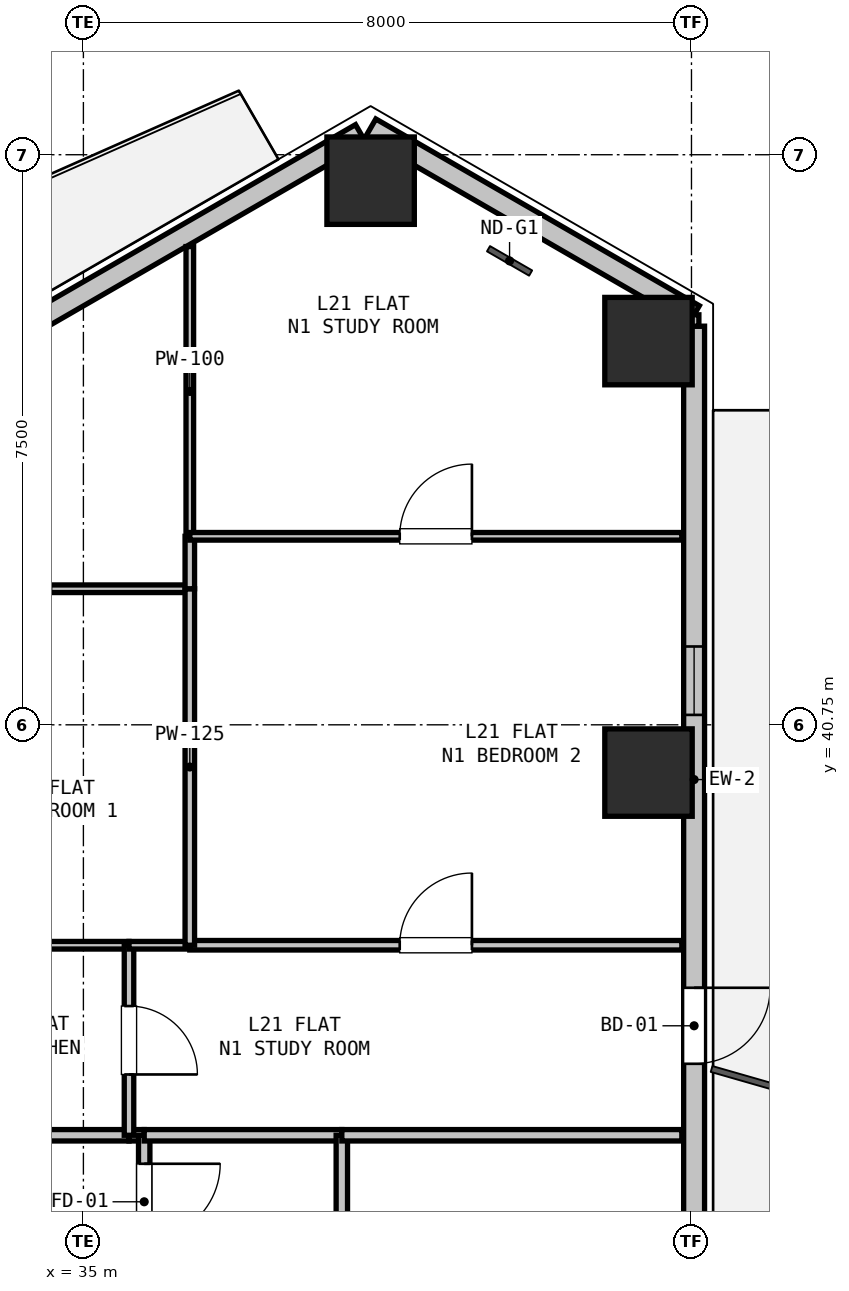
"""IFC4 building model, lengths in metres.
Left out: names, types, materials, properties, quantities, classifications, styles, units other than length and angle.
Written with IfcOpenShell. Run it as: python <this file> out.ifc"""

import sys

from ifc_helpers import new_model, si_unit, direction, frame, frame_2d, origin, origin_2d, place, context, subcontext, project, spatial, rectangle, hollow_rectangle, extrude, element, fill, save


model = new_model("IFC4")
c1 = context("Model", 3, precision=1e-05, world=origin(), true_north=direction((0.0, 1.0)))
c2 = subcontext(c1, "Body", "Model", "MODEL_VIEW")
j1 = project(units=[si_unit("LENGTHUNIT", "METRE"), si_unit("PLANEANGLEUNIT", "RADIAN")], contexts=[c1])
p1 = place(None, origin())
s1 = spatial("IfcSite", under=j1, at=p1, CompositionType="ELEMENT")
p2 = place(p1, origin())
s2 = spatial("IfcBuilding", under=s1, at=p2, CompositionType="ELEMENT")
p3 = place(p2, frame((0.0, 0.0, 80.1)))
s3 = spatial("IfcBuildingStorey", under=s2, at=p3, CompositionType="ELEMENT", Elevation=80.1)
for number, where, z_axis, x_axis in (
    (1, (38.779, 47.909, 0.0), (0.0, 0.0, 1.0), (1.0, 0.0, 0.0)),
    (2, (42.435, 45.798, 0.0), (0.0, 0.0, 1.0), (1.0, 0.0, 0.0)),
    (3, (42.435, 40.122, 0.0), (0.0, 0.0, 1.0), (1.0, 0.0, 0.0)),
):
    element("IfcColumn", number, at=place(p3, frame(where, z_axis=z_axis, x_axis=x_axis)), inside=s3, PredefinedType="COLUMN", context=c2, shape_type="SweptSolid", body=[
        extrude(hollow_rectangle(XDim=1.15, YDim=1.15, WallThickness=0.032, at=origin_2d()), origin(), (0.0, 0.0, 1.0), 3.3),
    ])
p4 = place(p3, frame((38.779, 48.602, 0.0), z_axis=(0.0, 0.0, 1.0), x_axis=(0.866011848704, -0.500023477353, 0.0)))
e4 = element("IfcWall", 4, at=p4, inside=s3, PredefinedType="SOLIDWALL", context=c2, shape_type="SweptSolid", body=[
    extrude(rectangle(XDim=4.914, YDim=0.275, at=frame_2d((2.457, 0.0))), origin(), (0.0, 0.0, 1.0), 2.67),
])
p5 = place(p3, frame((28.317, 42.562, 0.0), z_axis=(0.0, 0.0, 1.0), x_axis=(0.866023023012, 0.500004123596, 0.0)))
e5 = element("IfcWall", 5, at=p5, inside=s3, PredefinedType="SOLIDWALL", context=c2, shape_type="SweptSolid", body=[
    extrude(rectangle(XDim=11.93, YDim=0.275, at=frame_2d((5.965, 0.0))), origin(), (0.0, 0.0, 1.0), 2.67),
])
p6 = place(p5, frame((2.427, 0.0, 0.9)))
e6 = element("IfcOpeningElement", 6, at=p6, cuts=e5, PredefinedType="OPENING", context=c2, shape_type="SweptSolid", body=[
    extrude(rectangle(XDim=0.9, YDim=1.4, at=frame_2d((0.45, 0.7))), frame((0.0, 0.147, 0.0), z_axis=(0.0, -1.0, 0.0), x_axis=(1.0, 0.0, 0.0)), (0.0, 0.0, 1.0), 0.295),
])
p7 = place(p3, frame((43.035, 45.994, 0.0), z_axis=(0.0, 0.0, 1.0), x_axis=(0.0, -1.0, 0.0)))
e7 = element("IfcWall", 7, at=p7, inside=s3, PredefinedType="SOLIDWALL", context=c2, shape_type="SweptSolid", body=[
    extrude(rectangle(XDim=11.93, YDim=0.275, at=frame_2d((5.965, 0.0))), origin(), (0.0, 0.0, 1.0), 2.67),
])
p8 = place(p7, frame((8.704, 0.0, 0.0)))
e8 = element("IfcOpeningElement", 8, at=p8, cuts=e7, PredefinedType="OPENING", context=c2, shape_type="SweptSolid", body=[
    extrude(rectangle(XDim=1.0, YDim=2.1, at=frame_2d((0.5, 1.05))), frame((0.0, 0.147, 0.0), z_axis=(0.0, -1.0, 0.0), x_axis=(1.0, 0.0, 0.0)), (0.0, 0.0, 1.0), 0.295),
])
p9 = place(p7, frame((4.214, 0.0, 0.9)))
e9 = element("IfcOpeningElement", 9, at=p9, cuts=e7, PredefinedType="OPENING", context=c2, shape_type="SweptSolid", body=[
    extrude(rectangle(XDim=0.9, YDim=1.4, at=frame_2d((0.45, 0.7))), frame((0.0, 0.147, 0.0), z_axis=(0.0, -1.0, 0.0), x_axis=(1.0, 0.0, 0.0)), (0.0, 0.0, 1.0), 0.295),
])
p10 = place(p3, frame((32.0, 35.35, 0.0), z_axis=(0.0, 0.0, 1.0), x_axis=(1.0, 0.0, 0.0)))
e10 = element("IfcWall", 10, at=p10, inside=s3, PredefinedType="PARTITIONING", context=c2, shape_type="SweptSolid", body=[
    extrude(rectangle(XDim=3.6, YDim=0.15, at=frame_2d((1.8, 0.0))), origin(), (0.0, 0.0, 1.0), 3.05),
])
p11 = place(p3, frame((35.6, 35.35, 0.0), z_axis=(0.0, 0.0, 1.0), x_axis=(1.0, 0.0, 0.0)))
e11 = element("IfcWall", 11, at=p11, inside=s3, PredefinedType="PARTITIONING", context=c2, shape_type="SweptSolid", body=[
    extrude(rectangle(XDim=0.2, YDim=0.15, at=frame_2d((0.1, 0.0))), origin(), (0.0, 0.0, 1.0), 3.05),
])
p12 = place(p3, frame((35.8, 35.35, 0.0), z_axis=(0.0, 0.0, 1.0), x_axis=(0.0, -1.0, 0.0)))
e12 = element("IfcWall", 12, at=p12, inside=s3, PredefinedType="PARTITIONING", context=c2, shape_type="SweptSolid", body=[
    extrude(rectangle(XDim=1.75, YDim=0.15, at=frame_2d((0.875, 0.0))), origin(), (0.0, 0.0, 1.0), 3.05),
])
p13 = place(p12, frame((0.375, 0.0, 0.0)))
e13 = element("IfcOpeningElement", 13, at=p13, cuts=e12, PredefinedType="OPENING", context=c2, shape_type="SweptSolid", body=[
    extrude(rectangle(XDim=1.0, YDim=2.15, at=frame_2d((0.5, 1.075))), frame((0.0, 0.085, 0.0), z_axis=(0.0, -1.0, 0.0), x_axis=(1.0, 0.0, 0.0)), (0.0, 0.0, 1.0), 0.17),
])
p14 = place(p3, frame((35.8, 35.35, 0.0), z_axis=(0.0, 0.0, 1.0), x_axis=(1.0, 0.0, 0.0)))
e14 = element("IfcWall", 14, at=p14, inside=s3, PredefinedType="PARTITIONING", context=c2, shape_type="SweptSolid", body=[
    extrude(rectangle(XDim=2.6, YDim=0.15, at=frame_2d((1.3, 0.0))), origin(), (0.0, 0.0, 1.0), 2.423),
])
p15 = place(p3, frame((38.4, 35.35, 0.0), z_axis=(0.0, 0.0, 1.0), x_axis=(0.0, -1.0, 0.0)))
e15 = element("IfcWall", 15, at=p15, inside=s3, PredefinedType="PARTITIONING", context=c2, shape_type="SweptSolid", body=[
    extrude(rectangle(XDim=5.35, YDim=0.15, at=frame_2d((2.675, 0.0))), origin(), (0.0, 0.0, 1.0), 3.05),
])
p16 = place(p3, frame((32.0, 37.85, 0.0), z_axis=(0.0, 0.0, 1.0), x_axis=(1.0, 0.0, 0.0)))
e16 = element("IfcWall", 16, at=p16, inside=s3, PredefinedType="PARTITIONING", context=c2, shape_type="SweptSolid", body=[
    extrude(rectangle(XDim=3.6, YDim=0.1, at=frame_2d((1.8, 0.0))), origin(), (0.0, 0.0, 1.0), 3.05),
])
p17 = place(p3, frame((35.6, 37.85, 0.0), z_axis=(0.0, 0.0, 1.0), x_axis=(0.0, -1.0, 0.0)))
e17 = element("IfcWall", 17, at=p17, inside=s3, PredefinedType="PARTITIONING", context=c2, shape_type="SweptSolid", body=[
    extrude(rectangle(XDim=2.5, YDim=0.125, at=frame_2d((1.25, 0.0))), origin(), (0.0, 0.0, 1.0), 3.05),
])
p18 = place(p17, frame((0.8, 0.0, 0.0)))
e18 = element("IfcOpeningElement", 18, at=p18, cuts=e17, PredefinedType="OPENING", context=c2, shape_type="SweptSolid", body=[
    extrude(rectangle(XDim=0.9, YDim=2.1, at=frame_2d((0.45, 1.05))), frame((0.0, 0.073, 0.0), z_axis=(0.0, -1.0, 0.0), x_axis=(1.0, 0.0, 0.0)), (0.0, 0.0, 1.0), 0.145),
])
p19 = place(p3, frame((42.873, 35.35, 0.0), z_axis=(0.0, 0.0, 1.0), x_axis=(-1.0, 0.0, 0.0)))
e19 = element("IfcWall", 19, at=p19, inside=s3, PredefinedType="PARTITIONING", context=c2, shape_type="SweptSolid", body=[
    extrude(rectangle(XDim=4.473, YDim=0.15, at=frame_2d((2.237, 0.0))), origin(), (0.0, 0.0, 1.0), 2.365),
])
p20 = place(p3, frame((35.6, 37.85, 0.0), z_axis=(0.0, 0.0, 1.0), x_axis=(1.0, 0.0, 0.0)))
e20 = element("IfcWall", 20, at=p20, inside=s3, PredefinedType="PARTITIONING", context=c2, shape_type="SweptSolid", body=[
    extrude(rectangle(XDim=0.8, YDim=0.1, at=frame_2d((0.4, 0.0))), origin(), (0.0, 0.0, 1.0), 3.05),
])
p21 = place(p3, frame((36.4, 37.85, 0.0), z_axis=(0.0, 0.0, 1.0), x_axis=(1.0, 0.0, 0.0)))
e21 = element("IfcWall", 21, at=p21, inside=s3, PredefinedType="PARTITIONING", context=c2, shape_type="SweptSolid", body=[
    extrude(rectangle(XDim=6.473, YDim=0.125, at=frame_2d((3.237, 0.0))), origin(), (0.0, 0.0, 1.0), 2.365),
])
p22 = place(p21, frame((2.762, 0.0, 0.0)))
e22 = element("IfcOpeningElement", 22, at=p22, cuts=e21, PredefinedType="OPENING", context=c2, shape_type="SweptSolid", body=[
    extrude(rectangle(XDim=0.95, YDim=2.1, at=frame_2d((0.475, 1.05))), frame((0.0, 0.073, 0.0), z_axis=(0.0, -1.0, 0.0), x_axis=(1.0, 0.0, 0.0)), (0.0, 0.0, 1.0), 0.145),
])
p23 = place(p3, frame((31.8, 42.54, 0.0), z_axis=(0.0, 0.0, 1.0), x_axis=(1.0, 0.0, 0.0)))
e23 = element("IfcWall", 23, at=p23, inside=s3, PredefinedType="PARTITIONING", context=c2, shape_type="SweptSolid", body=[
    extrude(rectangle(XDim=4.6, YDim=0.1, at=frame_2d((2.3, 0.0))), origin(), (0.0, 0.0, 1.0), 3.05),
])
p24 = place(p23, frame((1.825, 0.0, 0.0)))
e24 = element("IfcOpeningElement", 24, at=p24, cuts=e23, PredefinedType="OPENING", context=c2, shape_type="SweptSolid", body=[
    extrude(rectangle(XDim=0.95, YDim=2.1, at=frame_2d((0.475, 1.05))), frame((0.0, 0.06, 0.0), z_axis=(0.0, -1.0, 0.0), x_axis=(1.0, 0.0, 0.0)), (0.0, 0.0, 1.0), 0.12),
])
p25 = place(p3, frame((36.4, 42.54, 0.0), z_axis=(0.0, 0.0, 1.0), x_axis=(0.0, -1.0, 0.0)))
e25 = element("IfcWall", 25, at=p25, inside=s3, PredefinedType="PARTITIONING", context=c2, shape_type="SweptSolid", body=[
    extrude(rectangle(XDim=4.69, YDim=0.125, at=frame_2d((2.345, 0.0))), origin(), (0.0, 0.0, 1.0), 3.05),
])
p26 = place(p3, frame((36.4, 47.042, 0.0), z_axis=(0.0, 0.0, 1.0), x_axis=(0.0, -1.0, 0.0)))
e26 = element("IfcWall", 26, at=p26, inside=s3, PredefinedType="PARTITIONING", context=c2, shape_type="SweptSolid", body=[
    extrude(rectangle(XDim=3.812, YDim=0.1, at=frame_2d((1.906, 0.0))), origin(), (0.0, 0.0, 1.0), 2.66),
])
p27 = place(p3, frame((36.4, 43.23, 0.0), z_axis=(0.0, 0.0, 1.0), x_axis=(0.0, -1.0, 0.0)))
e27 = element("IfcWall", 27, at=p27, inside=s3, PredefinedType="PARTITIONING", context=c2, shape_type="SweptSolid", body=[
    extrude(rectangle(XDim=0.69, YDim=0.125, at=frame_2d((0.345, 0.0))), origin(), (0.0, 0.0, 1.0), 3.05),
])
p28 = place(p3, frame((36.4, 43.23, 0.0), z_axis=(0.0, 0.0, 1.0), x_axis=(1.0, 0.0, 0.0)))
e28 = element("IfcWall", 28, at=p28, inside=s3, PredefinedType="PARTITIONING", context=c2, shape_type="SweptSolid", body=[
    extrude(rectangle(XDim=6.473, YDim=0.1, at=frame_2d((3.237, 0.0))), origin(), (0.0, 0.0, 1.0), 2.423),
])
p29 = place(p28, frame((2.762, 0.0, 0.0)))
e29 = element("IfcOpeningElement", 29, at=p29, cuts=e28, PredefinedType="OPENING", context=c2, shape_type="SweptSolid", body=[
    extrude(rectangle(XDim=0.95, YDim=2.1, at=frame_2d((0.475, 1.05))), frame((0.0, 0.06, 0.0), z_axis=(0.0, -1.0, 0.0), x_axis=(1.0, 0.0, 0.0)), (0.0, 0.0, 1.0), 0.12),
])
p30 = place(p3, frame((43.035, 46.144, 0.0), z_axis=(0.0, 0.0, 1.0), x_axis=(0.0, -1.0, 0.0)))
e30 = element("IfcWall", 30, at=p30, inside=s3, PredefinedType="PARTITIONING", context=c2, shape_type="SweptSolid", body=[
    extrude(rectangle(XDim=0.15, YDim=0.125, at=frame_2d((0.075, 0.0))), origin(), (0.0, 0.0, 1.0), 3.05),
])
p31 = place(p8, origin())
e31 = element("IfcDoor", 31, at=p31, inside=s3, OperationType="SINGLE_SWING_LEFT", PredefinedType="DOOR", context=c2, shape_type="SweptSolid", body=[
    extrude(rectangle(XDim=1.0, YDim=2.1, at=frame_2d((0.5, 1.05))), frame((0.0, 0.025, 0.0), z_axis=(0.0, -1.0, 0.0), x_axis=(1.0, 0.0, 0.0)), (0.0, 0.0, 1.0), 0.05),
])
fill(e8, e31)
p32 = place(p9, origin())
e32 = element("IfcWindow", 32, at=p32, inside=s3, PartitioningType="SINGLE_PANEL", PredefinedType="WINDOW", context=c2, shape_type="SweptSolid", body=[
    extrude(rectangle(XDim=0.9, YDim=1.4, at=frame_2d((0.45, 0.7))), frame((0.0, 0.03, 0.0), z_axis=(0.0, -1.0, 0.0), x_axis=(1.0, 0.0, 0.0)), (0.0, 0.0, 1.0), 0.06),
])
fill(e9, e32)
p33 = place(p13, origin())
e33 = element("IfcDoor", 33, at=p33, inside=s3, OperationType="SINGLE_SWING_LEFT", PredefinedType="DOOR", context=c2, shape_type="SweptSolid", body=[
    extrude(rectangle(XDim=1.0, YDim=2.15, at=frame_2d((0.5, 1.075))), frame((0.0, 0.025, 0.0), z_axis=(0.0, -1.0, 0.0), x_axis=(1.0, 0.0, 0.0)), (0.0, 0.0, 1.0), 0.05),
])
fill(e13, e33)
p34 = place(p22, origin())
e34 = element("IfcDoor", 34, at=p34, inside=s3, OperationType="SINGLE_SWING_RIGHT", PredefinedType="DOOR", context=c2, shape_type="SweptSolid", body=[
    extrude(rectangle(XDim=0.95, YDim=2.1, at=frame_2d((0.475, 1.05))), frame((0.0, 0.025, 0.0), z_axis=(0.0, -1.0, 0.0), x_axis=(1.0, 0.0, 0.0)), (0.0, 0.0, 1.0), 0.05),
])
fill(e22, e34)
p35 = place(p29, origin())
e35 = element("IfcDoor", 35, at=p35, inside=s3, OperationType="SINGLE_SWING_RIGHT", PredefinedType="DOOR", context=c2, shape_type="SweptSolid", body=[
    extrude(rectangle(XDim=0.95, YDim=2.1, at=frame_2d((0.475, 1.05))), frame((0.0, 0.025, 0.0), z_axis=(0.0, -1.0, 0.0), x_axis=(1.0, 0.0, 0.0)), (0.0, 0.0, 1.0), 0.05),
])
fill(e29, e35)
p36 = place(p18, origin())
e36 = element("IfcDoor", 36, at=p36, inside=s3, OperationType="SINGLE_SWING_RIGHT", PredefinedType="DOOR", context=c2, shape_type="SweptSolid", body=[
    extrude(rectangle(XDim=0.9, YDim=2.1, at=frame_2d((0.45, 1.05))), frame((0.0, 0.025, 0.0), z_axis=(0.0, -1.0, 0.0), x_axis=(1.0, 0.0, 0.0)), (0.0, 0.0, 1.0), 0.05),
])
fill(e18, e36)
save(model, sys.argv[1])
